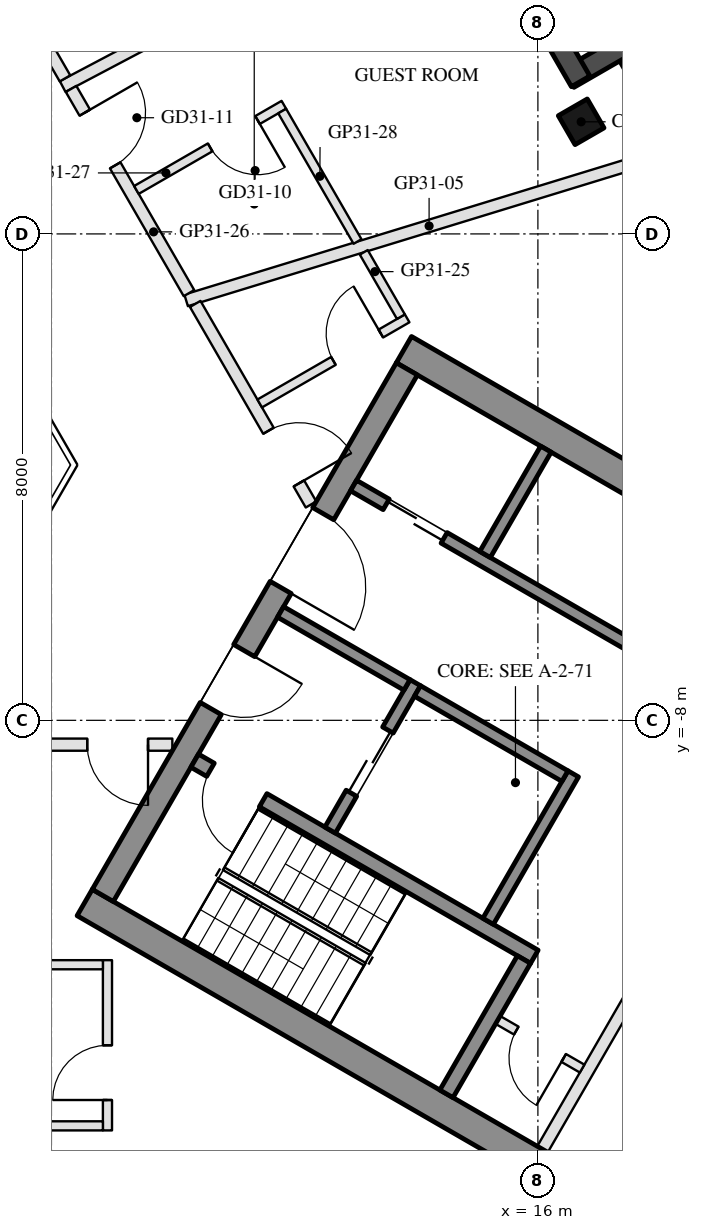
"""IFC4 building model, lengths in metres.
Left out: names, types, materials, properties, quantities, classifications, styles, units other than length and angle.
Written with IfcOpenShell. Run it as: python <this file> out.ifc"""

import sys

from ifc_helpers import new_model, si_unit, direction, frame, frame_2d, origin, origin_2d, place, context, subcontext, project, spatial, rectangle, hollow_rectangle, extrude, boolean, halfspace, element, fill, save


model = new_model("IFC4")
c1 = context("Model", 3, precision=1e-05, world=origin(), true_north=direction((0.0, 1.0)))
c2 = subcontext(c1, "Body", "Model", "MODEL_VIEW")
j1 = project(units=[si_unit("LENGTHUNIT", "METRE"), si_unit("PLANEANGLEUNIT", "RADIAN")], contexts=[c1])
p1 = place(None, origin())
s1 = spatial("IfcSite", under=j1, at=p1, CompositionType="ELEMENT")
p2 = place(p1, origin())
s2 = spatial("IfcBuilding", under=s1, at=p2, CompositionType="ELEMENT")
p3 = place(p2, frame((0.0, 0.0, 305.9)))
s3 = spatial("IfcBuildingStorey", under=s2, at=p3, CompositionType="ELEMENT", Elevation=305.9)
p4 = place(p3, frame((16.711, 1.844, 0.0), z_axis=(0.0, 0.0, 1.0), x_axis=(-0.5, 0.866025403784, 0.0)))
e1 = element("IfcColumn", 1, at=p4, inside=s3, PredefinedType="COLUMN", context=c2, shape_type="SweptSolid", body=[
    boolean("DIFFERENCE", extrude(hollow_rectangle(XDim=0.55, YDim=0.55, WallThickness=0.025, at=origin_2d()), origin(), (0.0, 0.0, 1.0), 3.7), halfspace(frame((0.0, 0.0, 3.666), z_axis=(0.0, 0.0, 1.0), x_axis=(1.0, 0.0, 0.0)), False)),
])
p5 = place(p3, frame((22.442, -5.632, 0.0), z_axis=(0.0, 0.0, 1.0), x_axis=(-0.499983205548, 0.866035099848, 0.0)))
e2 = element("IfcWall", 2, at=p5, inside=s3, PredefinedType="SOLIDWALL", context=c2, shape_type="SweptSolid", body=[
    extrude(rectangle(XDim=10.239, YDim=0.35, at=frame_2d((5.12, 0.0))), origin(), (0.0, 0.0, 1.0), 3.55),
])
p6 = place(p5, frame((5.32, 0.0, 0.0)))
e3 = element("IfcOpeningElement", 3, at=p6, cuts=e2, PredefinedType="OPENING", context=c2, shape_type="SweptSolid", body=[
    extrude(rectangle(XDim=2.4, YDim=2.4, at=frame_2d((1.2, 1.2))), frame((0.0, 0.185, 0.0), z_axis=(0.0, -1.0, 0.0), x_axis=(1.0, 0.0, 0.0)), (0.0, 0.0, 1.0), 0.37),
])
p7 = place(p5, frame((3.205, 0.0, 0.3)))
e4 = element("IfcOpeningElement", 4, at=p7, cuts=e2, PredefinedType="OPENING", context=c2, shape_type="SweptSolid", body=[
    extrude(rectangle(XDim=1.8, YDim=2.65, at=frame_2d((0.9, 1.325))), frame((0.0, 0.185, 0.0), z_axis=(0.0, -1.0, 0.0), x_axis=(1.0, 0.0, 0.0)), (0.0, 0.0, 1.0), 0.37),
])
p8 = place(p3, frame((17.562, 3.172, 0.0), z_axis=(0.0, 0.0, 1.0), x_axis=(-0.866005645448, -0.500034220881, 0.0)))
e5 = element("IfcWall", 5, at=p8, inside=s3, PredefinedType="SOLIDWALL", context=c2, shape_type="SweptSolid", body=[
    extrude(rectangle(XDim=1.22, YDim=0.35, at=frame_2d((0.61, 0.0))), origin(), (0.0, 0.0, 1.0), 3.55),
])
p9 = place(p3, frame((16.703, 2.509, 0.0), z_axis=(0.0, 0.0, 1.0), x_axis=(-0.499975351079, 0.866039634378, 0.0)))
e6 = element("IfcWall", 6, at=p9, inside=s3, PredefinedType="SOLIDWALL", context=c2, shape_type="SweptSolid", body=[
    extrude(rectangle(XDim=5.599, YDim=0.35, at=frame_2d((2.799, 0.0))), origin(), (0.0, 0.0, 1.0), 3.55),
])
p10 = place(p9, frame((0.917, 0.0, 0.0)))
e7 = element("IfcOpeningElement", 7, at=p10, cuts=e6, PredefinedType="OPENING", context=c2, shape_type="SweptSolid", body=[
    extrude(rectangle(XDim=2.4, YDim=2.4, at=frame_2d((1.2, 1.2))), frame((0.0, 0.185, 0.0), z_axis=(0.0, -1.0, 0.0), x_axis=(1.0, 0.0, 0.0)), (0.0, 0.0, 1.0), 0.37),
])
p11 = place(p9, frame((4.363, 0.0, 0.3)))
e8 = element("IfcOpeningElement", 8, at=p11, cuts=e6, PredefinedType="OPENING", context=c2, shape_type="SweptSolid", body=[
    extrude(rectangle(XDim=0.9, YDim=2.65, at=frame_2d((0.45, 1.325))), frame((0.0, 0.185, 0.0), z_axis=(0.0, -1.0, 0.0), x_axis=(1.0, 0.0, 0.0)), (0.0, 0.0, 1.0), 0.37),
])
for number, where, z_axis, x_axis in (
    (9, (8.547, -10.997, 0.0), (0.0, 0.0, 1.0), (0.866, -0.5, 0.0)),
    (10, (13.797, -1.903, 0.0), (0.0, 0.0, 1.0), (0.866, -0.5, 0.0)),
):
    element("IfcWall", number, at=place(p3, frame(where, z_axis=z_axis, x_axis=x_axis)), inside=s3, PredefinedType="SHEAR", context=c2, shape_type="SweptSolid", body=[
        extrude(rectangle(XDim=10.298, YDim=0.5, at=frame_2d((5.149, 0.0))), origin(), (0.0, 0.0, 1.0), 3.5),
    ])
p12 = place(p3, frame((8.845, -10.88, 0.0), z_axis=(0.0, 0.0, 1.0), x_axis=(0.500004234368, 0.866022959057, 0.0)))
e11 = element("IfcWall", 11, at=p12, inside=s3, PredefinedType="SHEAR", context=c2, shape_type="SweptSolid", body=[
    extrude(rectangle(XDim=10.0, YDim=0.4, at=frame_2d((5.0, 0.0))), origin(), (0.0, 0.0, 1.0), 3.5),
])
p13 = place(p12, frame((3.55, 0.0, 0.0)))
e12 = element("IfcOpeningElement", 12, at=p13, cuts=e11, PredefinedType="OPENING", context=c2, shape_type="SweptSolid", body=[
    extrude(rectangle(XDim=1.1, YDim=2.1, at=frame_2d((0.55, 1.05))), frame((0.0, 0.21, 0.0), z_axis=(0.0, -1.0, 0.0), x_axis=(1.0, 0.0, 0.0)), (0.0, 0.0, 1.0), 0.42),
])
p14 = place(p12, frame((5.85, 0.0, 0.0)))
e13 = element("IfcOpeningElement", 13, at=p14, cuts=e11, PredefinedType="OPENING", context=c2, shape_type="SweptSolid", body=[
    extrude(rectangle(XDim=1.4, YDim=2.1, at=frame_2d((0.7, 1.05))), frame((0.0, 0.21, 0.0), z_axis=(0.0, -1.0, 0.0), x_axis=(1.0, 0.0, 0.0)), (0.0, 0.0, 1.0), 0.42),
])
p15 = place(p3, frame((10.356, -8.664, 0.0), z_axis=(0.0, 0.0, 1.0), x_axis=(0.866028629588, -0.499994412703, 0.0)))
e14 = element("IfcWall", 14, at=p15, inside=s3, PredefinedType="SHEAR", context=c2, shape_type="SweptSolid", body=[
    extrude(rectangle(XDim=6.45, YDim=0.25, at=frame_2d((3.225, 0.0))), origin(), (0.0, 0.0, 1.0), 3.5),
])
p16 = place(p15, frame((0.3, 0.0, 0.0)))
e15 = element("IfcOpeningElement", 15, at=p16, cuts=e14, PredefinedType="OPENING", context=c2, shape_type="SweptSolid", body=[
    extrude(rectangle(XDim=1.0, YDim=2.1, at=frame_2d((0.5, 1.05))), frame((0.0, 0.135, 0.0), z_axis=(0.0, -1.0, 0.0), x_axis=(1.0, 0.0, 0.0)), (0.0, 0.0, 1.0), 0.27),
])
p17 = place(p3, frame((14.496, -14.143, 0.0), z_axis=(0.0, 0.0, 1.0), x_axis=(0.500062241894, 0.865989465428, 0.0)))
e16 = element("IfcWall", 16, at=p17, inside=s3, PredefinedType="SHEAR", context=c2, shape_type="SweptSolid", body=[
    extrude(rectangle(XDim=2.55, YDim=0.25, at=frame_2d((1.275, 0.0))), origin(), (0.0, 0.0, 1.0), 3.5),
])
p18 = place(p3, frame((15.181, -11.305, 0.0), z_axis=(0.0, 0.0, 1.0), x_axis=(0.49994636267, 0.866056369097, 0.0)))
e17 = element("IfcWall", 17, at=p18, inside=s3, PredefinedType="SHEAR", context=c2, shape_type="SweptSolid", body=[
    extrude(rectangle(XDim=2.8, YDim=0.2, at=frame_2d((1.4, 0.0))), origin(), (0.0, 0.0, 1.0), 3.5),
])
p19 = place(p3, frame((12.583, -9.805, 0.0), z_axis=(0.0, 0.0, 1.0), x_axis=(0.49994636267, 0.866056369097, 0.0)))
e18 = element("IfcWall", 18, at=p19, inside=s3, PredefinedType="SHEAR", context=c2, shape_type="SweptSolid", body=[
    extrude(rectangle(XDim=2.8, YDim=0.2, at=frame_2d((1.4, 0.0))), origin(), (0.0, 0.0, 1.0), 3.5),
])
p20 = place(p19, frame((0.7, 0.0, 0.0)))
e19 = element("IfcOpeningElement", 19, at=p20, cuts=e18, PredefinedType="OPENING", context=c2, shape_type="SweptSolid", body=[
    extrude(rectangle(XDim=1.2, YDim=2.1, at=frame_2d((0.6, 1.05))), frame((0.0, 0.11, 0.0), z_axis=(0.0, -1.0, 0.0), x_axis=(1.0, 0.0, 0.0)), (0.0, 0.0, 1.0), 0.22),
])
p21 = place(p3, frame((11.768, -6.217, 0.0), z_axis=(0.0, 0.0, 1.0), x_axis=(0.866050077142, -0.499957262057, 0.0)))
e20 = element("IfcWall", 20, at=p21, inside=s3, PredefinedType="SHEAR", context=c2, shape_type="SweptSolid", body=[
    extrude(rectangle(XDim=2.4, YDim=0.2, at=frame_2d((1.2, 0.0))), origin(), (0.0, 0.0, 1.0), 3.5),
])
p22 = place(p3, frame((14.02, -7.517, 0.0), z_axis=(0.0, 0.0, 1.0), x_axis=(0.866034573852, -0.49998411664, 0.0)))
e21 = element("IfcWall", 21, at=p22, inside=s3, PredefinedType="SHEAR", context=c2, shape_type="SweptSolid", body=[
    extrude(rectangle(XDim=2.8, YDim=0.2, at=frame_2d((1.4, 0.0))), origin(), (0.0, 0.0, 1.0), 3.5),
])
p23 = place(p3, frame((12.968, -4.138, 0.0), z_axis=(0.0, 0.0, 1.0), x_axis=(0.866028328073, -0.49999493495, 0.0)))
e22 = element("IfcWall", 22, at=p23, inside=s3, PredefinedType="SHEAR", context=c2, shape_type="SweptSolid", body=[
    extrude(rectangle(XDim=10.16, YDim=0.2, at=frame_2d((5.08, 0.0))), origin(), (0.0, 0.0, 1.0), 3.5),
])
p24 = place(p23, frame((0.62, 0.0, 0.0)))
e23 = element("IfcOpeningElement", 23, at=p24, cuts=e22, PredefinedType="OPENING", context=c2, shape_type="SweptSolid", body=[
    extrude(rectangle(XDim=1.1, YDim=2.1, at=frame_2d((0.55, 1.05))), frame((0.0, 0.11, 0.0), z_axis=(0.0, -1.0, 0.0), x_axis=(1.0, 0.0, 0.0)), (0.0, 0.0, 1.0), 0.22),
])
p25 = place(p23, frame((5.8, 0.0, 0.0)))
e24 = element("IfcOpeningElement", 24, at=p25, cuts=e22, PredefinedType="OPENING", context=c2, shape_type="SweptSolid", body=[
    extrude(rectangle(XDim=0.9, YDim=2.1, at=frame_2d((0.45, 1.05))), frame((0.0, 0.11, 0.0), z_axis=(0.0, -1.0, 0.0), x_axis=(1.0, 0.0, 0.0)), (0.0, 0.0, 1.0), 0.22),
])
p26 = place(p3, frame((15.131, -5.272, 0.0), z_axis=(0.0, 0.0, 1.0), x_axis=(0.499972520799, 0.866041268327, 0.0)))
e25 = element("IfcWall", 25, at=p26, inside=s3, PredefinedType="SHEAR", context=c2, shape_type="SweptSolid", body=[
    extrude(rectangle(XDim=2.0, YDim=0.2, at=frame_2d((1.0, 0.0))), origin(), (0.0, 0.0, 1.0), 3.5),
])
p27 = place(p3, frame((16.076, -15.055, 0.0), z_axis=(0.0, 0.0, 1.0), x_axis=(0.499995103361, 0.866028230842, 0.0)))
e26 = element("IfcWall", 26, at=p27, inside=s3, PredefinedType="PARTITIONING", context=c2, shape_type="SweptSolid", body=[
    extrude(rectangle(XDim=5.4, YDim=0.2, at=frame_2d((2.7, 0.0))), origin(), (0.0, 0.0, 1.0), 3.5),
])
p28 = place(p27, frame((2.9, 0.0, 0.0)))
e27 = element("IfcOpeningElement", 27, at=p28, cuts=e26, PredefinedType="OPENING", context=c2, shape_type="SweptSolid", body=[
    extrude(rectangle(XDim=0.9, YDim=2.1, at=frame_2d((0.45, 1.05))), frame((0.0, 0.11, 0.0), z_axis=(0.0, -1.0, 0.0), x_axis=(1.0, 0.0, 0.0)), (0.0, 0.0, 1.0), 0.22),
])
p29 = place(p3, frame((15.342, -12.928, 0.0), z_axis=(0.0, 0.0, 1.0), x_axis=(0.865989903783, -0.500061482766, 0.0)))
e28 = element("IfcWall", 28, at=p29, inside=s3, PredefinedType="PARTITIONING", context=c2, shape_type="SweptSolid", body=[
    extrude(rectangle(XDim=1.6, YDim=0.15, at=frame_2d((0.8, 0.0))), origin(), (0.0, 0.0, 1.0), 3.5),
])
p30 = place(p29, frame((0.35, 0.0, 0.0)))
e29 = element("IfcOpeningElement", 29, at=p30, cuts=e28, PredefinedType="OPENING", context=c2, shape_type="SweptSolid", body=[
    extrude(rectangle(XDim=0.9, YDim=2.1, at=frame_2d((0.45, 1.05))), frame((0.0, 0.085, 0.0), z_axis=(0.0, -1.0, 0.0), x_axis=(1.0, 0.0, 0.0)), (0.0, 0.0, 1.0), 0.17),
])
p31 = place(p3, frame((18.206, 1.355, 0.0), z_axis=(0.0, 0.0, 1.0), x_axis=(-0.956150885444, -0.292874519658, 0.0)))
e30 = element("IfcWall", 30, at=p31, inside=s3, PredefinedType="PARTITIONING", context=c2, shape_type="SweptSolid", body=[
    extrude(rectangle(XDim=8.358, YDim=0.2, at=frame_2d((4.179, 0.0))), origin(), (0.0, 0.0, 1.0), 3.1),
])
p32 = place(p3, frame((14.595, 5.81, 0.0), z_axis=(0.0, 0.0, 1.0), x_axis=(-0.884286267242, -0.46694517619, 0.0)))
e31 = element("IfcWall", 31, at=p32, inside=s3, PredefinedType="PARTITIONING", context=c2, shape_type="SweptSolid", body=[
    extrude(rectangle(XDim=7.25, YDim=0.2, at=frame_2d((3.625, 0.0))), origin(), (0.0, 0.0, 1.0), 3.1),
])
p33 = place(p3, frame((9.988, -8.4, 0.0), z_axis=(0.0, 0.0, 1.0), x_axis=(-1.0, 0.0, 0.0)))
e32 = element("IfcWall", 32, at=p33, inside=s3, PredefinedType="PARTITIONING", context=c2, shape_type="SweptSolid", body=[
    extrude(rectangle(XDim=3.809, YDim=0.2, at=frame_2d((1.904, 0.0))), origin(), (0.0, 0.0, 1.0), 3.1),
])
p34 = place(p33, frame((0.4, 0.0, 0.0)))
e33 = element("IfcOpeningElement", 33, at=p34, cuts=e32, PredefinedType="OPENING", context=c2, shape_type="SweptSolid", body=[
    extrude(rectangle(XDim=1.0, YDim=2.1, at=frame_2d((0.5, 1.05))), frame((0.0, 0.11, 0.0), z_axis=(0.0, -1.0, 0.0), x_axis=(1.0, 0.0, 0.0)), (0.0, 0.0, 1.0), 0.22),
])
p35 = place(p3, frame((8.921, -14.745, 0.0), z_axis=(0.0, 0.0, 1.0), x_axis=(0.0, 1.0, 0.0)))
e34 = element("IfcWall", 34, at=p35, inside=s3, PredefinedType="PARTITIONING", context=c2, shape_type="SweptSolid", body=[
    extrude(rectangle(XDim=2.8, YDim=0.15, at=frame_2d((1.4, 0.0))), origin(), (0.0, 0.0, 1.0), 3.1),
])
p36 = place(p35, frame((0.5, 0.0, 0.0)))
e35 = element("IfcOpeningElement", 35, at=p36, cuts=e34, PredefinedType="OPENING", context=c2, shape_type="SweptSolid", body=[
    extrude(rectangle(XDim=0.9, YDim=2.1, at=frame_2d((0.45, 1.05))), frame((0.0, 0.085, 0.0), z_axis=(0.0, -1.0, 0.0), x_axis=(1.0, 0.0, 0.0)), (0.0, 0.0, 1.0), 0.17),
])
p37 = place(p3, frame((7.624, -14.67, 0.0), z_axis=(0.0, 0.0, 1.0), x_axis=(1.0, 0.0, 0.0)))
e36 = element("IfcWall", 36, at=p37, inside=s3, PredefinedType="PARTITIONING", context=c2, shape_type="SweptSolid", body=[
    extrude(rectangle(XDim=1.222, YDim=0.15, at=frame_2d((0.611, 0.0))), origin(), (0.0, 0.0, 1.0), 3.1),
])
p38 = place(p3, frame((7.013, -12.02, 0.0), z_axis=(0.0, 0.0, 1.0), x_axis=(1.0, 0.0, 0.0)))
e37 = element("IfcWall", 37, at=p38, inside=s3, PredefinedType="PARTITIONING", context=c2, shape_type="SweptSolid", body=[
    extrude(rectangle(XDim=1.833, YDim=0.15, at=frame_2d((0.917, 0.0))), origin(), (0.0, 0.0, 1.0), 3.55),
])
p39 = place(p3, frame((10.365, -1.152, 0.0), z_axis=(0.0, 0.0, 1.0), x_axis=(0.499999897272, -0.866025463095, 0.0)))
e38 = element("IfcWall", 38, at=p39, inside=s3, PredefinedType="PARTITIONING", context=c2, shape_type="SweptSolid", body=[
    extrude(rectangle(XDim=3.809, YDim=0.2, at=frame_2d((1.904, 0.0))), origin(), (0.0, 0.0, 1.0), 3.1),
])
p40 = place(p39, frame((2.409, 0.0, 0.0)))
e39 = element("IfcOpeningElement", 39, at=p40, cuts=e38, PredefinedType="OPENING", context=c2, shape_type="SweptSolid", body=[
    extrude(rectangle(XDim=1.0, YDim=2.1, at=frame_2d((0.5, 1.05))), frame((0.0, 0.11, 0.0), z_axis=(0.0, -1.0, 0.0), x_axis=(1.0, 0.0, 0.0)), (0.0, 0.0, 1.0), 0.22),
])
p41 = place(p3, frame((11.425, -2.789, 0.0), z_axis=(0.0, 0.0, 1.0), x_axis=(0.865996816683, 0.500049511043, 0.0)))
e40 = element("IfcWall", 40, at=p41, inside=s3, PredefinedType="PARTITIONING", context=c2, shape_type="SweptSolid", body=[
    extrude(rectangle(XDim=2.8, YDim=0.15, at=frame_2d((1.4, 0.0))), origin(), (0.0, 0.0, 1.0), 3.55),
])
p42 = place(p41, frame((1.4, 0.0, 0.0)))
e41 = element("IfcOpeningElement", 41, at=p42, cuts=e40, PredefinedType="OPENING", context=c2, shape_type="SweptSolid", body=[
    extrude(rectangle(XDim=0.9, YDim=2.1, at=frame_2d((0.45, 1.05))), frame((0.0, 0.085, 0.0), z_axis=(0.0, -1.0, 0.0), x_axis=(1.0, 0.0, 0.0)), (0.0, 0.0, 1.0), 0.17),
])
p43 = place(p3, frame((13.747, -1.361, 0.0), z_axis=(0.0, 0.0, 1.0), x_axis=(-0.499941460885, 0.86605919872, 0.0)))
e42 = element("IfcWall", 42, at=p43, inside=s3, PredefinedType="PARTITIONING", context=c2, shape_type="SweptSolid", body=[
    extrude(rectangle(XDim=1.222, YDim=0.15, at=frame_2d((0.611, 0.0))), origin(), (0.0, 0.0, 1.0), 3.1),
])
p44 = place(p3, frame((8.323, 2.385, 0.0), z_axis=(0.0, 0.0, 1.0), x_axis=(0.499998569178, -0.866026229868, 0.0)))
e43 = element("IfcWall", 43, at=p44, inside=s3, PredefinedType="PARTITIONING", context=c2, shape_type="SweptSolid", body=[
    extrude(rectangle(XDim=3.878, YDim=0.2, at=frame_2d((1.939, 0.0))), origin(), (0.0, 0.0, 1.0), 3.1),
])
p45 = place(p44, frame((0.451, 0.0, 0.0)))
e44 = element("IfcOpeningElement", 44, at=p45, cuts=e43, PredefinedType="OPENING", context=c2, shape_type="SweptSolid", body=[
    extrude(rectangle(XDim=1.0, YDim=2.1, at=frame_2d((0.5, 1.05))), frame((0.0, 0.11, 0.0), z_axis=(0.0, -1.0, 0.0), x_axis=(1.0, 0.0, 0.0)), (0.0, 0.0, 1.0), 0.22),
])
p46 = place(p3, frame((11.822, 2.123, 0.0), z_axis=(0.0, 0.0, 1.0), x_axis=(-0.865996816683, -0.500049511043, 0.0)))
e45 = element("IfcWall", 45, at=p46, inside=s3, PredefinedType="PARTITIONING", context=c2, shape_type="SweptSolid", body=[
    extrude(rectangle(XDim=2.8, YDim=0.15, at=frame_2d((1.4, 0.0))), origin(), (0.0, 0.0, 1.0), 3.55),
])
p47 = place(p46, frame((0.5, 0.0, 0.0)))
e46 = element("IfcOpeningElement", 46, at=p47, cuts=e45, PredefinedType="OPENING", context=c2, shape_type="SweptSolid", body=[
    extrude(rectangle(XDim=0.9, YDim=2.1, at=frame_2d((0.45, 1.05))), frame((0.0, 0.085, 0.0), z_axis=(0.0, -1.0, 0.0), x_axis=(1.0, 0.0, 0.0)), (0.0, 0.0, 1.0), 0.17),
])
p48 = place(p3, frame((13.034, -0.125, 0.0), z_axis=(0.0, 0.0, 1.0), x_axis=(-0.499975499923, 0.866039548448, 0.0)))
e47 = element("IfcWall", 47, at=p48, inside=s3, PredefinedType="PARTITIONING", context=c2, shape_type="SweptSolid", body=[
    extrude(rectangle(XDim=2.478, YDim=0.15, at=frame_2d((1.239, 0.0))), origin(), (0.0, 0.0, 1.0), 3.55),
])
p49 = place(p3, frame((6.325, 5.845, 0.0), z_axis=(0.0, 0.0, 1.0), x_axis=(0.499971120268, -0.866042076863, 0.0)))
e48 = element("IfcWall", 48, at=p49, inside=s3, PredefinedType="PARTITIONING", context=c2, shape_type="SweptSolid", body=[
    extrude(rectangle(XDim=3.796, YDim=0.2, at=frame_2d((1.898, 0.0))), origin(), (0.0, 0.0, 1.0), 3.1),
])
p50 = place(p49, frame((0.402, 0.0, 0.0)))
e49 = element("IfcOpeningElement", 49, at=p50, cuts=e48, PredefinedType="OPENING", context=c2, shape_type="SweptSolid", body=[
    extrude(rectangle(XDim=1.0, YDim=2.1, at=frame_2d((0.5, 1.05))), frame((0.0, 0.11, 0.0), z_axis=(0.0, -1.0, 0.0), x_axis=(1.0, 0.0, 0.0)), (0.0, 0.0, 1.0), 0.22),
])
p51 = place(p20, origin())
e50 = element("IfcDoor", 50, at=p51, inside=s3, OperationType="DOUBLE_DOOR_SLIDING", PredefinedType="DOOR", context=c2, shape_type="SweptSolid", body=[
    extrude(rectangle(XDim=1.2, YDim=2.1, at=frame_2d((0.6, 1.05))), frame((0.0, 0.025, 0.0), z_axis=(0.0, -1.0, 0.0), x_axis=(1.0, 0.0, 0.0)), (0.0, 0.0, 1.0), 0.05),
])
fill(e19, e50)
p52 = place(p30, frame((0.9, 0.0, 0.0), z_axis=(0.0, 0.0, 1.0), x_axis=(-1.0, 0.0, 0.0)))
e51 = element("IfcDoor", 51, at=p52, inside=s3, OperationType="SINGLE_SWING_LEFT", PredefinedType="DOOR", context=c2, shape_type="SweptSolid", body=[
    extrude(rectangle(XDim=0.9, YDim=2.1, at=frame_2d((0.45, 1.05))), frame((0.0, 0.025, 0.0), z_axis=(0.0, -1.0, 0.0), x_axis=(1.0, 0.0, 0.0)), (0.0, 0.0, 1.0), 0.05),
])
fill(e29, e51)
p53 = place(p24, origin())
e52 = element("IfcDoor", 52, at=p53, inside=s3, OperationType="DOUBLE_DOOR_SLIDING", PredefinedType="DOOR", context=c2, shape_type="SweptSolid", body=[
    extrude(rectangle(XDim=1.1, YDim=2.1, at=frame_2d((0.55, 1.05))), frame((0.0, 0.025, 0.0), z_axis=(0.0, -1.0, 0.0), x_axis=(1.0, 0.0, 0.0)), (0.0, 0.0, 1.0), 0.05),
])
fill(e23, e52)
p54 = place(p13, frame((1.1, 0.0, 0.0), z_axis=(0.0, 0.0, 1.0), x_axis=(-1.0, 0.0, 0.0)))
e53 = element("IfcDoor", 53, at=p54, inside=s3, OperationType="SINGLE_SWING_LEFT", PredefinedType="DOOR", context=c2, shape_type="SweptSolid", body=[
    extrude(rectangle(XDim=1.1, YDim=2.1, at=frame_2d((0.55, 1.05))), frame((0.0, 0.025, 0.0), z_axis=(0.0, -1.0, 0.0), x_axis=(1.0, 0.0, 0.0)), (0.0, 0.0, 1.0), 0.05),
])
fill(e12, e53)
p55 = place(p14, frame((1.4, 0.0, 0.0), z_axis=(0.0, 0.0, 1.0), x_axis=(-1.0, 0.0, 0.0)))
e54 = element("IfcDoor", 54, at=p55, inside=s3, OperationType="DOUBLE_DOOR_SINGLE_SWING", PredefinedType="DOOR", context=c2, shape_type="SweptSolid", body=[
    extrude(rectangle(XDim=1.4, YDim=2.1, at=frame_2d((0.7, 1.05))), frame((0.0, 0.025, 0.0), z_axis=(0.0, -1.0, 0.0), x_axis=(1.0, 0.0, 0.0)), (0.0, 0.0, 1.0), 0.05),
])
fill(e13, e54)
p56 = place(p16, frame((1.0, 0.0, 0.0), z_axis=(0.0, 0.0, 1.0), x_axis=(-1.0, 0.0, 0.0)))
e55 = element("IfcDoor", 55, at=p56, inside=s3, OperationType="SINGLE_SWING_LEFT", PredefinedType="DOOR", context=c2, shape_type="SweptSolid", body=[
    extrude(rectangle(XDim=1.0, YDim=2.1, at=frame_2d((0.5, 1.05))), frame((0.0, 0.025, 0.0), z_axis=(0.0, -1.0, 0.0), x_axis=(1.0, 0.0, 0.0)), (0.0, 0.0, 1.0), 0.05),
])
fill(e15, e55)
p57 = place(p36, origin())
e56 = element("IfcDoor", 56, at=p57, inside=s3, OperationType="SINGLE_SWING_LEFT", PredefinedType="DOOR", context=c2, shape_type="SweptSolid", body=[
    extrude(rectangle(XDim=0.9, YDim=2.1, at=frame_2d((0.45, 1.05))), frame((0.0, 0.025, 0.0), z_axis=(0.0, -1.0, 0.0), x_axis=(1.0, 0.0, 0.0)), (0.0, 0.0, 1.0), 0.05),
])
fill(e35, e56)
p58 = place(p34, origin())
e57 = element("IfcDoor", 57, at=p58, inside=s3, OperationType="SINGLE_SWING_LEFT", PredefinedType="DOOR", context=c2, shape_type="SweptSolid", body=[
    extrude(rectangle(XDim=1.0, YDim=2.1, at=frame_2d((0.5, 1.05))), frame((0.0, 0.025, 0.0), z_axis=(0.0, -1.0, 0.0), x_axis=(1.0, 0.0, 0.0)), (0.0, 0.0, 1.0), 0.05),
])
fill(e33, e57)
p59 = place(p42, origin())
e58 = element("IfcDoor", 58, at=p59, inside=s3, OperationType="SINGLE_SWING_RIGHT", PredefinedType="DOOR", context=c2, shape_type="SweptSolid", body=[
    extrude(rectangle(XDim=0.9, YDim=2.1, at=frame_2d((0.45, 1.05))), frame((0.0, 0.025, 0.0), z_axis=(0.0, -1.0, 0.0), x_axis=(1.0, 0.0, 0.0)), (0.0, 0.0, 1.0), 0.05),
])
fill(e41, e58)
p60 = place(p40, origin())
e59 = element("IfcDoor", 59, at=p60, inside=s3, OperationType="SINGLE_SWING_RIGHT", PredefinedType="DOOR", context=c2, shape_type="SweptSolid", body=[
    extrude(rectangle(XDim=1.0, YDim=2.1, at=frame_2d((0.5, 1.05))), frame((0.0, 0.025, 0.0), z_axis=(0.0, -1.0, 0.0), x_axis=(1.0, 0.0, 0.0)), (0.0, 0.0, 1.0), 0.05),
])
fill(e39, e59)
p61 = place(p47, origin())
e60 = element("IfcDoor", 60, at=p61, inside=s3, OperationType="SINGLE_SWING_LEFT", PredefinedType="DOOR", context=c2, shape_type="SweptSolid", body=[
    extrude(rectangle(XDim=0.9, YDim=2.1, at=frame_2d((0.45, 1.05))), frame((0.0, 0.025, 0.0), z_axis=(0.0, -1.0, 0.0), x_axis=(1.0, 0.0, 0.0)), (0.0, 0.0, 1.0), 0.05),
])
fill(e46, e60)
p62 = place(p45, origin())
e61 = element("IfcDoor", 61, at=p62, inside=s3, OperationType="SINGLE_SWING_LEFT", PredefinedType="DOOR", context=c2, shape_type="SweptSolid", body=[
    extrude(rectangle(XDim=1.0, YDim=2.1, at=frame_2d((0.5, 1.05))), frame((0.0, 0.025, 0.0), z_axis=(0.0, -1.0, 0.0), x_axis=(1.0, 0.0, 0.0)), (0.0, 0.0, 1.0), 0.05),
])
fill(e44, e61)
save(model, sys.argv[1])
